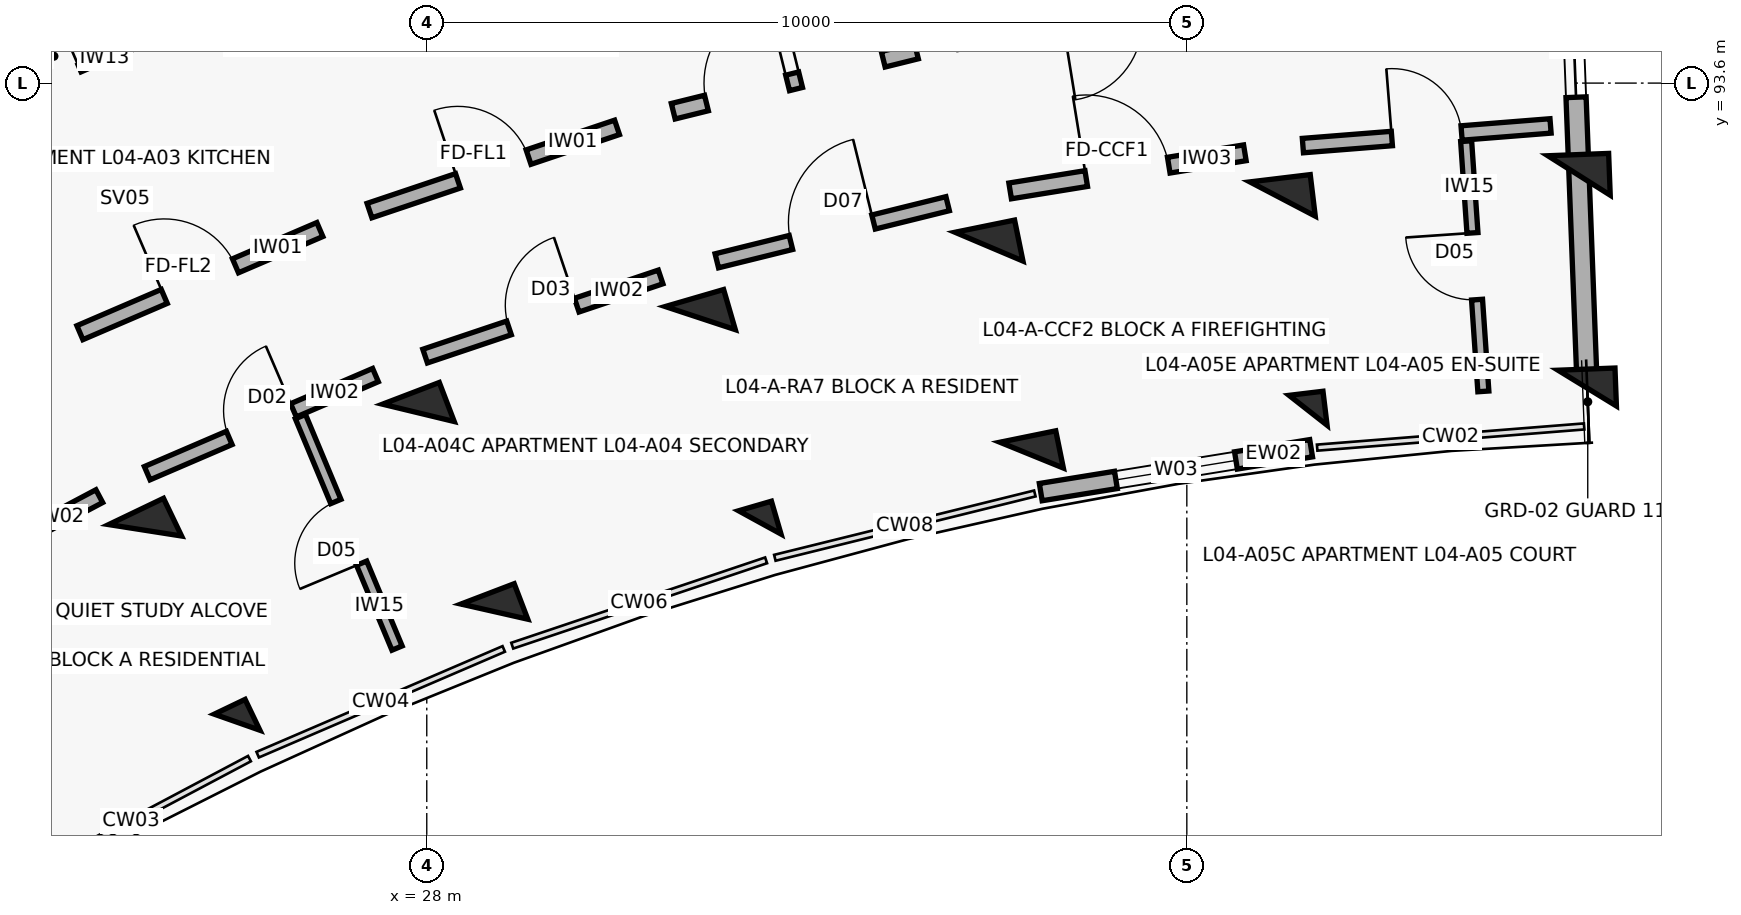
"""IFC4 building model, lengths in metres.
Left out: names, types, materials, properties, quantities, classifications, styles, units other than length and angle.
Written with IfcOpenShell. Run it as: python <this file> out.ifc"""

import sys

from ifc_helpers import new_model, si_unit, direction, frame, frame_2d, origin, origin_2d, place, context, subcontext, project, spatial, rectangle, extrude, element, fill, save


model = new_model("IFC4")
c1 = context("Model", 3, precision=1e-05, world=origin(), true_north=direction((0.0, 1.0)))
c2 = subcontext(c1, "Body", "Model", "MODEL_VIEW")
j1 = project(units=[si_unit("LENGTHUNIT", "METRE"), si_unit("PLANEANGLEUNIT", "RADIAN")], contexts=[c1])
p1 = place(None, origin())
s1 = spatial("IfcSite", under=j1, at=p1, CompositionType="ELEMENT")
p2 = place(p1, origin())
s2 = spatial("IfcBuilding", under=s1, at=p2, CompositionType="ELEMENT")
p3 = place(p2, frame((0.0, 0.0, 14.3)))
s3 = spatial("IfcBuildingStorey", under=s2, at=p3, CompositionType="ELEMENT", Elevation=14.3)
p4 = place(p3, frame((25.504, 85.191, 0.0), z_axis=(0.0, 0.0, 1.0), x_axis=(-0.432085748802, 0.901832526405, 0.0)))
e1 = element("IfcColumn", 1, at=p4, inside=s3, PredefinedType="COLUMN", context=c2, shape_type="SweptSolid", body=[
    extrude(rectangle(XDim=0.45, YDim=0.45, at=origin_2d()), origin(), (0.0, 0.0, 1.0), 3.1),
])
p5 = place(p3, frame((24.294, 87.716, 0.0), z_axis=(0.0, 0.0, 1.0), x_axis=(-0.432085748802, 0.901832526405, 0.0)))
e2 = element("IfcColumn", 2, at=p5, inside=s3, PredefinedType="COLUMN", context=c2, shape_type="SweptSolid", body=[
    extrude(rectangle(XDim=0.55, YDim=0.8, at=origin_2d()), origin(), (0.0, 0.0, 1.0), 3.1),
])
p6 = place(p3, frame((28.889, 86.646, 0.0), z_axis=(0.0, 0.0, 1.0), x_axis=(-0.357064076459, 0.934079892355, 0.0)))
e3 = element("IfcColumn", 3, at=p6, inside=s3, PredefinedType="COLUMN", context=c2, shape_type="SweptSolid", body=[
    extrude(rectangle(XDim=0.5, YDim=0.75, at=origin_2d()), origin(), (0.0, 0.0, 1.0), 3.1),
])
p7 = place(p3, frame((27.889, 89.261, 0.0), z_axis=(0.0, 0.0, 1.0), x_axis=(-0.357064076459, 0.934079892355, 0.0)))
e4 = element("IfcColumn", 4, at=p7, inside=s3, PredefinedType="COLUMN", context=c2, shape_type="SweptSolid", body=[
    extrude(rectangle(XDim=0.55, YDim=0.8, at=origin_2d()), origin(), (0.0, 0.0, 1.0), 3.1),
])
p8 = place(p3, frame((32.382, 87.82, 0.0), z_axis=(0.0, 0.0, 1.0), x_axis=(-0.27966144946, 0.96009867914, 0.0)))
e5 = element("IfcColumn", 5, at=p8, inside=s3, PredefinedType="COLUMN", context=c2, shape_type="SweptSolid", body=[
    extrude(rectangle(XDim=0.45, YDim=0.45, at=origin_2d()), origin(), (0.0, 0.0, 1.0), 3.1),
])
p9 = place(p3, frame((31.599, 90.508, 0.0), z_axis=(0.0, 0.0, 1.0), x_axis=(-0.27966144946, 0.96009867914, 0.0)))
e6 = element("IfcColumn", 6, at=p9, inside=s3, PredefinedType="COLUMN", context=c2, shape_type="SweptSolid", body=[
    extrude(rectangle(XDim=0.55, YDim=0.8, at=origin_2d()), origin(), (0.0, 0.0, 1.0), 3.1),
])
p10 = place(p3, frame((35.958, 88.705, 0.0), z_axis=(0.0, 0.0, 1.0), x_axis=(-0.200393999665, 0.979715389742, 0.0)))
e7 = element("IfcColumn", 7, at=p10, inside=s3, PredefinedType="COLUMN", context=c2, shape_type="SweptSolid", body=[
    extrude(rectangle(XDim=0.5, YDim=0.75, at=origin_2d()), origin(), (0.0, 0.0, 1.0), 3.1),
])
p11 = place(p3, frame((35.397, 91.448, 0.0), z_axis=(0.0, 0.0, 1.0), x_axis=(-0.200393999665, 0.979715389742, 0.0)))
e8 = element("IfcColumn", 8, at=p11, inside=s3, PredefinedType="COLUMN", context=c2, shape_type="SweptSolid", body=[
    extrude(rectangle(XDim=0.55, YDim=0.8, at=origin_2d()), origin(), (0.0, 0.0, 1.0), 3.1),
])
p12 = place(p3, frame((39.595, 89.295, 0.0), z_axis=(0.0, 0.0, 1.0), x_axis=(-0.119790293837, 0.992799217114, 0.0)))
e9 = element("IfcColumn", 9, at=p12, inside=s3, PredefinedType="COLUMN", context=c2, shape_type="SweptSolid", body=[
    extrude(rectangle(XDim=0.45, YDim=0.45, at=origin_2d()), origin(), (0.0, 0.0, 1.0), 3.1),
])
p13 = place(p3, frame((39.26, 92.075, 0.0), z_axis=(0.0, 0.0, 1.0), x_axis=(-0.119790293837, 0.992799217114, 0.0)))
e10 = element("IfcColumn", 10, at=p13, inside=s3, PredefinedType="COLUMN", context=c2, shape_type="SweptSolid", body=[
    extrude(rectangle(XDim=0.55, YDim=0.8, at=origin_2d()), origin(), (0.0, 0.0, 1.0), 3.1),
])
p14 = place(p3, frame((43.268, 89.587, 0.0), z_axis=(0.0, 0.0, 1.0), x_axis=(-0.038387809088, 0.999262916411, 0.0)))
e11 = element("IfcColumn", 11, at=p14, inside=s3, PredefinedType="COLUMN", context=c2, shape_type="SweptSolid", body=[
    extrude(rectangle(XDim=0.5, YDim=0.75, at=origin_2d()), origin(), (0.0, 0.0, 1.0), 3.1),
])
p15 = place(p3, frame((43.16, 92.385, 0.0), z_axis=(0.0, 0.0, 1.0), x_axis=(-0.038387809088, 0.999262916411, 0.0)))
e12 = element("IfcColumn", 12, at=p15, inside=s3, PredefinedType="COLUMN", context=c2, shape_type="SweptSolid", body=[
    extrude(rectangle(XDim=0.55, YDim=0.8, at=origin_2d()), origin(), (0.0, 0.0, 1.0), 3.1),
])
p16 = place(p3, frame((36.078, 88.218, 0.0), z_axis=(0.0, 0.0, 1.0), x_axis=(0.987080874485, 0.160222804952, 0.0)))
e13 = element("IfcWall", 13, at=p16, inside=s3, PredefinedType="SOLIDWALL", context=c2, shape_type="SweptSolid", body=[
    extrude(rectangle(XDim=3.604, YDim=0.23, at=frame_2d((1.802, 0.0))), origin(), (0.0, 0.0, 1.0), 2.25),
])
p17 = place(p16, frame((1.002, 0.0, 0.32)))
e14 = element("IfcOpeningElement", 14, at=p17, cuts=e13, PredefinedType="OPENING", context=c2, shape_type="SweptSolid", body=[
    extrude(rectangle(XDim=1.6, YDim=1.5, at=frame_2d((0.8, 0.75))), frame((0.0, 0.125, 0.0), z_axis=(0.0, -1.0, 0.0), x_axis=(1.0, 0.0, 0.0)), (0.0, 0.0, 1.0), 0.25),
])
p18 = place(p3, frame((43.259, 89.827, 0.0), z_axis=(0.0, 0.0, 1.0), x_axis=(-0.038407966241, 0.999262141847, 0.0)))
e15 = element("IfcWall", 15, at=p18, inside=s3, PredefinedType="SOLIDWALL", context=c2, shape_type="SweptSolid", body=[
    extrude(rectangle(XDim=8.2, YDim=0.265, at=frame_2d((4.1, 0.0))), origin(), (0.0, 0.0, 1.0), 2.08),
])
p19 = place(p18, frame((3.59, 0.0, 0.75)))
e16 = element("IfcOpeningElement", 16, at=p19, cuts=e15, PredefinedType="OPENING", context=c2, shape_type="SweptSolid", body=[
    extrude(rectangle(XDim=1.35, YDim=1.35, at=frame_2d((0.675, 0.675))), frame((0.0, 0.142, 0.0), z_axis=(0.0, -1.0, 0.0), x_axis=(1.0, 0.0, 0.0)), (0.0, 0.0, 1.0), 0.285),
])
p20 = place(p3, frame((20.804, 86.634, 0.0), z_axis=(0.0, 0.0, 1.0), x_axis=(0.883444301944, 0.468536194293, 0.0)))
e17 = element("IfcWall", 17, at=p20, inside=s3, PredefinedType="SOLIDWALL", context=c2, shape_type="SweptSolid", body=[
    extrude(rectangle(XDim=3.269, YDim=0.19, at=frame_2d((1.634, 0.0))), origin(), (0.0, 0.0, 1.0), 2.08),
])
p21 = place(p20, frame((1.184, 0.0, 0.0)))
e18 = element("IfcOpeningElement", 18, at=p21, cuts=e17, PredefinedType="OPENING", context=c2, shape_type="SweptSolid", body=[
    extrude(rectangle(XDim=0.9, YDim=2.1, at=frame_2d((0.45, 1.05))), frame((0.0, 0.105, 0.0), z_axis=(0.0, -1.0, 0.0), x_axis=(1.0, 0.0, 0.0)), (0.0, 0.0, 1.0), 0.21),
])
p22 = place(p3, frame((23.437, 90.316, 0.0), z_axis=(0.0, 0.0, 1.0), x_axis=(0.918718172399, 0.394913813008, 0.0)))
e19 = element("IfcWall", 19, at=p22, inside=s3, PredefinedType="SOLIDWALL", context=c2, shape_type="SweptSolid", body=[
    extrude(rectangle(XDim=3.436, YDim=0.2, at=frame_2d((1.718, 0.0))), origin(), (0.0, 0.0, 1.0), 2.08),
])
p23 = place(p22, frame((1.208, 0.0, 0.0)))
e20 = element("IfcOpeningElement", 20, at=p23, cuts=e19, PredefinedType="OPENING", context=c2, shape_type="SweptSolid", body=[
    extrude(rectangle(XDim=1.02, YDim=2.15, at=frame_2d((0.51, 1.075))), frame((0.0, 0.11, 0.0), z_axis=(0.0, -1.0, 0.0), x_axis=(1.0, 0.0, 0.0)), (0.0, 0.0, 1.0), 0.22),
])
p24 = place(p3, frame((24.322, 88.467, 0.0), z_axis=(0.0, 0.0, 1.0), x_axis=(0.918723391052, 0.394901672235, 0.0)))
e21 = element("IfcWall", 21, at=p24, inside=s3, PredefinedType="SOLIDWALL", context=c2, shape_type="SweptSolid", body=[
    extrude(rectangle(XDim=3.269, YDim=0.19, at=frame_2d((1.634, 0.0))), origin(), (0.0, 0.0, 1.0), 2.08),
])
p25 = place(p24, frame((1.174, 0.0, 0.0)))
e22 = element("IfcOpeningElement", 22, at=p25, cuts=e21, PredefinedType="OPENING", context=c2, shape_type="SweptSolid", body=[
    extrude(rectangle(XDim=0.92, YDim=2.1, at=frame_2d((0.46, 1.05))), frame((0.0, 0.105, 0.0), z_axis=(0.0, -1.0, 0.0), x_axis=(1.0, 0.0, 0.0)), (0.0, 0.0, 1.0), 0.21),
])
p26 = place(p3, frame((27.609, 86.166, 0.0), z_axis=(0.0, 0.0, 1.0), x_axis=(-0.385151143297, 0.922853507777, 0.0)))
e23 = element("IfcWall", 23, at=p26, inside=s3, PredefinedType="PARTITIONING", context=c2, shape_type="SweptSolid", body=[
    extrude(rectangle(XDim=3.3, YDim=0.145, at=frame_2d((1.65, 0.0))), origin(), (0.0, 0.0, 1.0), 2.08),
])
p27 = place(p26, frame((1.21, 0.0, 0.0)))
e24 = element("IfcOpeningElement", 24, at=p27, cuts=e23, PredefinedType="OPENING", context=c2, shape_type="SweptSolid", body=[
    extrude(rectangle(XDim=0.88, YDim=2.1, at=frame_2d((0.44, 1.05))), frame((0.0, 0.083, 0.0), z_axis=(0.0, -1.0, 0.0), x_axis=(1.0, 0.0, 0.0)), (0.0, 0.0, 1.0), 0.165),
])
p28 = place(p3, frame((22.008, 93.182, 0.0), z_axis=(0.0, 0.0, 1.0), x_axis=(0.918732171064, 0.394881245253, 0.0)))
e25 = element("IfcWall", 25, at=p28, inside=s3, PredefinedType="PARTITIONING", context=c2, shape_type="SweptSolid", body=[
    extrude(rectangle(XDim=3.797, YDim=0.1, at=frame_2d((1.899, 0.0))), origin(), (0.0, 0.0, 1.0), 2.08),
])
p29 = place(p28, frame((0.65, 0.0, 0.0)))
e26 = element("IfcOpeningElement", 26, at=p29, cuts=e25, PredefinedType="OPENING", context=c2, shape_type="SweptSolid", body=[
    extrude(rectangle(XDim=0.9, YDim=2.1, at=frame_2d((0.45, 1.05))), frame((0.0, 0.06, 0.0), z_axis=(0.0, -1.0, 0.0), x_axis=(1.0, 0.0, 0.0)), (0.0, 0.0, 1.0), 0.12),
])
p30 = place(p28, frame((2.267, 0.0, 0.0)))
e27 = element("IfcOpeningElement", 27, at=p30, cuts=e25, PredefinedType="OPENING", context=c2, shape_type="SweptSolid", body=[
    extrude(rectangle(XDim=0.88, YDim=2.1, at=frame_2d((0.44, 1.05))), frame((0.0, 0.06, 0.0), z_axis=(0.0, -1.0, 0.0), x_axis=(1.0, 0.0, 0.0)), (0.0, 0.0, 1.0), 0.12),
])
p31 = place(p3, frame((27.247, 91.923, 0.0), z_axis=(0.0, 0.0, 1.0), x_axis=(0.947863007629, 0.318678080151, 0.0)))
e28 = element("IfcWall", 28, at=p31, inside=s3, PredefinedType="SOLIDWALL", context=c2, shape_type="SweptSolid", body=[
    extrude(rectangle(XDim=3.436, YDim=0.2, at=frame_2d((1.718, 0.0))), origin(), (0.0, 0.0, 1.0), 2.08),
])
p32 = place(p31, frame((1.228, 0.0, 0.0)))
e29 = element("IfcOpeningElement", 29, at=p32, cuts=e28, PredefinedType="OPENING", context=c2, shape_type="SweptSolid", body=[
    extrude(rectangle(XDim=0.98, YDim=2.15, at=frame_2d((0.49, 1.075))), frame((0.0, 0.11, 0.0), z_axis=(0.0, -1.0, 0.0), x_axis=(1.0, 0.0, 0.0)), (0.0, 0.0, 1.0), 0.22),
])
p33 = place(p3, frame((27.979, 90.008, 0.0), z_axis=(0.0, 0.0, 1.0), x_axis=(0.94787351033, 0.318646839643, 0.0)))
e30 = element("IfcWall", 30, at=p33, inside=s3, PredefinedType="SOLIDWALL", context=c2, shape_type="SweptSolid", body=[
    extrude(rectangle(XDim=3.269, YDim=0.19, at=frame_2d((1.634, 0.0))), origin(), (0.0, 0.0, 1.0), 2.08),
])
p34 = place(p33, frame((1.164, 0.0, 0.0)))
e31 = element("IfcOpeningElement", 31, at=p34, cuts=e30, PredefinedType="OPENING", context=c2, shape_type="SweptSolid", body=[
    extrude(rectangle(XDim=0.94, YDim=2.1, at=frame_2d((0.47, 1.05))), frame((0.0, 0.105, 0.0), z_axis=(0.0, -1.0, 0.0), x_axis=(1.0, 0.0, 0.0)), (0.0, 0.0, 1.0), 0.21),
])
p35 = place(p3, frame((31.243, 93.23, 0.0), z_axis=(0.0, 0.0, 1.0), x_axis=(0.970719238682, 0.240216901263, 0.0)))
e32 = element("IfcWall", 32, at=p35, inside=s3, PredefinedType="SOLIDWALL", context=c2, shape_type="SweptSolid", body=[
    extrude(rectangle(XDim=3.296, YDim=0.21, at=frame_2d((1.648, 0.0))), origin(), (0.0, 0.0, 1.0), 2.08),
])
p36 = place(p35, frame((0.45, 0.0, 0.0)))
e33 = element("IfcOpeningElement", 33, at=p36, cuts=e32, PredefinedType="OPENING", context=c2, shape_type="SweptSolid", body=[
    extrude(rectangle(XDim=1.1, YDim=2.15, at=frame_2d((0.55, 1.075))), frame((0.0, 0.115, 0.0), z_axis=(0.0, -1.0, 0.0), x_axis=(1.0, 0.0, 0.0)), (0.0, 0.0, 1.0), 0.23),
])
p37 = place(p35, frame((1.726, 0.0, 0.0)))
e34 = element("IfcOpeningElement", 34, at=p37, cuts=e32, PredefinedType="OPENING", context=c2, shape_type="SweptSolid", body=[
    extrude(rectangle(XDim=1.12, YDim=2.15, at=frame_2d((0.56, 1.075))), frame((0.0, 0.115, 0.0), z_axis=(0.0, -1.0, 0.0), x_axis=(1.0, 0.0, 0.0)), (0.0, 0.0, 1.0), 0.23),
])
p38 = place(p3, frame((31.816, 91.262, 0.0), z_axis=(0.0, 0.0, 1.0), x_axis=(0.970727194092, 0.240184751078, 0.0)))
e35 = element("IfcWall", 35, at=p38, inside=s3, PredefinedType="SOLIDWALL", context=c2, shape_type="SweptSolid", body=[
    extrude(rectangle(XDim=3.129, YDim=0.19, at=frame_2d((1.564, 0.0))), origin(), (0.0, 0.0, 1.0), 2.08),
])
p39 = place(p38, frame((1.004, 0.0, 0.0)))
e36 = element("IfcOpeningElement", 36, at=p39, cuts=e35, PredefinedType="OPENING", context=c2, shape_type="SweptSolid", body=[
    extrude(rectangle(XDim=1.12, YDim=2.15, at=frame_2d((0.56, 1.075))), frame((0.0, 0.105, 0.0), z_axis=(0.0, -1.0, 0.0), x_axis=(1.0, 0.0, 0.0)), (0.0, 0.0, 1.0), 0.21),
])
p40 = place(p3, frame((35.676, 92.181, 0.0), z_axis=(0.0, 0.0, 1.0), x_axis=(0.98707079686, 0.160284877599, 0.0)))
e37 = element("IfcWall", 37, at=p40, inside=s3, PredefinedType="SOLIDWALL", context=c2, shape_type="SweptSolid", body=[
    extrude(rectangle(XDim=3.129, YDim=0.21, at=frame_2d((1.564, 0.0))), origin(), (0.0, 0.0, 1.0), 2.08),
])
p41 = place(p40, frame((1.014, 0.0, 0.0)))
e38 = element("IfcOpeningElement", 38, at=p41, cuts=e37, PredefinedType="OPENING", context=c2, shape_type="SweptSolid", body=[
    extrude(rectangle(XDim=1.1, YDim=2.15, at=frame_2d((0.55, 1.075))), frame((0.0, 0.115, 0.0), z_axis=(0.0, -1.0, 0.0), x_axis=(1.0, 0.0, 0.0)), (0.0, 0.0, 1.0), 0.23),
])
p42 = place(p3, frame((39.527, 92.778, 0.0), z_axis=(0.0, 0.0, 1.0), x_axis=(0.99686660806, 0.07910098441, 0.0)))
e39 = element("IfcWall", 39, at=p42, inside=s3, PredefinedType="SOLIDWALL", context=c2, shape_type="SweptSolid", body=[
    extrude(rectangle(XDim=3.269, YDim=0.19, at=frame_2d((1.634, 0.0))), origin(), (0.0, 0.0, 1.0), 2.08),
])
p43 = place(p42, frame((1.174, 0.0, 0.0)))
e40 = element("IfcOpeningElement", 40, at=p43, cuts=e39, PredefinedType="OPENING", context=c2, shape_type="SweptSolid", body=[
    extrude(rectangle(XDim=0.92, YDim=2.1, at=frame_2d((0.46, 1.05))), frame((0.0, 0.105, 0.0), z_axis=(0.0, -1.0, 0.0), x_axis=(1.0, 0.0, 0.0)), (0.0, 0.0, 1.0), 0.21),
])
p44 = place(p3, frame((41.901, 89.543, 0.0), z_axis=(0.0, 0.0, 1.0), x_axis=(-0.068581194944, 0.997645538105, 0.0)))
e41 = element("IfcWall", 41, at=p44, inside=s3, PredefinedType="PARTITIONING", context=c2, shape_type="SweptSolid", body=[
    extrude(rectangle(XDim=3.3, YDim=0.145, at=frame_2d((1.65, 0.0))), origin(), (0.0, 0.0, 1.0), 2.08),
])
p45 = place(p44, frame((1.21, 0.0, 0.0)))
e42 = element("IfcOpeningElement", 42, at=p45, cuts=e41, PredefinedType="OPENING", context=c2, shape_type="SweptSolid", body=[
    extrude(rectangle(XDim=0.88, YDim=2.1, at=frame_2d((0.44, 1.05))), frame((0.0, 0.083, 0.0), z_axis=(0.0, -1.0, 0.0), x_axis=(1.0, 0.0, 0.0)), (0.0, 0.0, 1.0), 0.165),
])
p46 = place(p17, origin())
e43 = element("IfcWindow", 43, at=p46, inside=s3, PartitioningType="DOUBLE_PANEL_VERTICAL", PredefinedType="WINDOW", context=c2, shape_type="SweptSolid", body=[
    extrude(rectangle(XDim=1.6, YDim=1.5, at=frame_2d((0.8, 0.75))), frame((0.0, 0.03, 0.0), z_axis=(0.0, -1.0, 0.0), x_axis=(1.0, 0.0, 0.0)), (0.0, 0.0, 1.0), 0.06),
])
fill(e14, e43)
p47 = place(p19, origin())
e44 = element("IfcWindow", 44, at=p47, inside=s3, PartitioningType="DOUBLE_PANEL_VERTICAL", PredefinedType="WINDOW", context=c2, shape_type="SweptSolid", body=[
    extrude(rectangle(XDim=1.35, YDim=1.35, at=frame_2d((0.675, 0.675))), frame((0.0, 0.03, 0.0), z_axis=(0.0, -1.0, 0.0), x_axis=(1.0, 0.0, 0.0)), (0.0, 0.0, 1.0), 0.06),
])
fill(e16, e44)
p48 = place(p23, origin())
e45 = element("IfcDoor", 45, at=p48, inside=s3, OperationType="SINGLE_SWING_LEFT", PredefinedType="DOOR", context=c2, shape_type="SweptSolid", body=[
    extrude(rectangle(XDim=1.02, YDim=2.15, at=frame_2d((0.51, 1.075))), frame((0.0, 0.025, 0.0), z_axis=(0.0, -1.0, 0.0), x_axis=(1.0, 0.0, 0.0)), (0.0, 0.0, 1.0), 0.05),
])
fill(e20, e45)
p49 = place(p25, origin())
e46 = element("IfcDoor", 46, at=p49, inside=s3, OperationType="SINGLE_SWING_RIGHT", PredefinedType="DOOR", context=c2, shape_type="SweptSolid", body=[
    extrude(rectangle(XDim=0.92, YDim=2.1, at=frame_2d((0.46, 1.05))), frame((0.0, 0.025, 0.0), z_axis=(0.0, -1.0, 0.0), x_axis=(1.0, 0.0, 0.0)), (0.0, 0.0, 1.0), 0.05),
])
fill(e22, e46)
p50 = place(p27, origin())
e47 = element("IfcDoor", 47, at=p50, inside=s3, OperationType="SINGLE_SWING_LEFT", PredefinedType="DOOR", context=c2, shape_type="SweptSolid", body=[
    extrude(rectangle(XDim=0.88, YDim=2.1, at=frame_2d((0.44, 1.05))), frame((0.0, 0.025, 0.0), z_axis=(0.0, -1.0, 0.0), x_axis=(1.0, 0.0, 0.0)), (0.0, 0.0, 1.0), 0.05),
])
fill(e24, e47)
p51 = place(p29, origin())
e48 = element("IfcDoor", 48, at=p51, inside=s3, OperationType="SINGLE_SWING_RIGHT", PredefinedType="DOOR", context=c2, shape_type="SweptSolid", body=[
    extrude(rectangle(XDim=0.9, YDim=2.1, at=frame_2d((0.45, 1.05))), frame((0.0, 0.025, 0.0), z_axis=(0.0, -1.0, 0.0), x_axis=(1.0, 0.0, 0.0)), (0.0, 0.0, 1.0), 0.05),
])
fill(e26, e48)
p52 = place(p32, origin())
e49 = element("IfcDoor", 49, at=p52, inside=s3, OperationType="SINGLE_SWING_LEFT", PredefinedType="DOOR", context=c2, shape_type="SweptSolid", body=[
    extrude(rectangle(XDim=0.98, YDim=2.15, at=frame_2d((0.49, 1.075))), frame((0.0, 0.025, 0.0), z_axis=(0.0, -1.0, 0.0), x_axis=(1.0, 0.0, 0.0)), (0.0, 0.0, 1.0), 0.05),
])
fill(e29, e49)
p53 = place(p34, origin())
e50 = element("IfcDoor", 50, at=p53, inside=s3, OperationType="SINGLE_SWING_RIGHT", PredefinedType="DOOR", context=c2, shape_type="SweptSolid", body=[
    extrude(rectangle(XDim=0.94, YDim=2.1, at=frame_2d((0.47, 1.05))), frame((0.0, 0.025, 0.0), z_axis=(0.0, -1.0, 0.0), x_axis=(1.0, 0.0, 0.0)), (0.0, 0.0, 1.0), 0.05),
])
fill(e31, e50)
p54 = place(p36, origin())
e51 = element("IfcDoor", 51, at=p54, inside=s3, OperationType="SINGLE_SWING_RIGHT", PredefinedType="DOOR", context=c2, shape_type="SweptSolid", body=[
    extrude(rectangle(XDim=1.1, YDim=2.15, at=frame_2d((0.55, 1.075))), frame((0.0, 0.025, 0.0), z_axis=(0.0, -1.0, 0.0), x_axis=(1.0, 0.0, 0.0)), (0.0, 0.0, 1.0), 0.05),
])
fill(e33, e51)
p55 = place(p37, origin())
e52 = element("IfcDoor", 52, at=p55, inside=s3, OperationType="SINGLE_SWING_LEFT", PredefinedType="DOOR", context=c2, shape_type="SweptSolid", body=[
    extrude(rectangle(XDim=1.12, YDim=2.15, at=frame_2d((0.56, 1.075))), frame((0.0, 0.025, 0.0), z_axis=(0.0, -1.0, 0.0), x_axis=(1.0, 0.0, 0.0)), (0.0, 0.0, 1.0), 0.05),
])
fill(e34, e52)
p56 = place(p39, origin())
e53 = element("IfcDoor", 53, at=p56, inside=s3, OperationType="SINGLE_SWING_RIGHT", PredefinedType="DOOR", context=c2, shape_type="SweptSolid", body=[
    extrude(rectangle(XDim=1.12, YDim=2.15, at=frame_2d((0.56, 1.075))), frame((0.0, 0.025, 0.0), z_axis=(0.0, -1.0, 0.0), x_axis=(1.0, 0.0, 0.0)), (0.0, 0.0, 1.0), 0.05),
])
fill(e36, e53)
p57 = place(p41, origin())
e54 = element("IfcDoor", 54, at=p57, inside=s3, OperationType="SINGLE_SWING_LEFT", PredefinedType="DOOR", context=c2, shape_type="SweptSolid", body=[
    extrude(rectangle(XDim=1.1, YDim=2.15, at=frame_2d((0.55, 1.075))), frame((0.0, 0.025, 0.0), z_axis=(0.0, -1.0, 0.0), x_axis=(1.0, 0.0, 0.0)), (0.0, 0.0, 1.0), 0.05),
])
fill(e38, e54)
p58 = place(p43, origin())
e55 = element("IfcDoor", 55, at=p58, inside=s3, OperationType="SINGLE_SWING_LEFT", PredefinedType="DOOR", context=c2, shape_type="SweptSolid", body=[
    extrude(rectangle(XDim=0.92, YDim=2.1, at=frame_2d((0.46, 1.05))), frame((0.0, 0.025, 0.0), z_axis=(0.0, -1.0, 0.0), x_axis=(1.0, 0.0, 0.0)), (0.0, 0.0, 1.0), 0.05),
])
fill(e40, e55)
p59 = place(p45, origin())
e56 = element("IfcDoor", 56, at=p59, inside=s3, OperationType="SINGLE_SWING_RIGHT", PredefinedType="DOOR", context=c2, shape_type="SweptSolid", body=[
    extrude(rectangle(XDim=0.88, YDim=2.1, at=frame_2d((0.44, 1.05))), frame((0.0, 0.025, 0.0), z_axis=(0.0, -1.0, 0.0), x_axis=(1.0, 0.0, 0.0)), (0.0, 0.0, 1.0), 0.05),
])
fill(e42, e56)
save(model, sys.argv[1])
